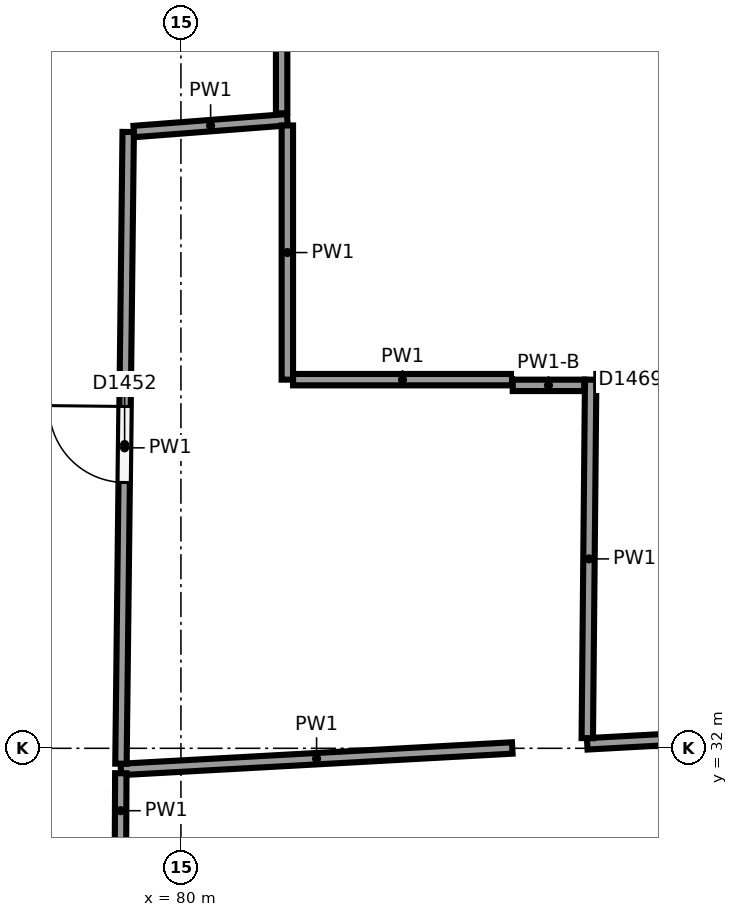
"""IFC4 building model, lengths in metres.
Left out: names, types, materials, properties, quantities, classifications, styles, units other than length and angle.
Written with IfcOpenShell. Run it as: python <this file> out.ifc"""

import sys

from ifc_helpers import new_model, si_unit, direction, frame, frame_2d, origin, origin_2d, place, context, subcontext, project, spatial, rectangle, circle, extrude, element, fill, save


model = new_model("IFC4")
c1 = context("Model", 3, precision=1e-05, world=origin(), true_north=direction((0.0, 1.0)))
c2 = subcontext(c1, "Body", "Model", "MODEL_VIEW")
j1 = project(units=[si_unit("LENGTHUNIT", "METRE"), si_unit("PLANEANGLEUNIT", "RADIAN")], contexts=[c1])
p1 = place(None, origin())
s1 = spatial("IfcSite", under=j1, at=p1, CompositionType="ELEMENT")
p2 = place(p1, origin())
s2 = spatial("IfcBuilding", under=s1, at=p2, CompositionType="ELEMENT")
p3 = place(p2, frame((0.0, 0.0, 18.0)))
s3 = spatial("IfcBuildingStorey", under=s2, at=p3, CompositionType="ELEMENT", Elevation=18.0)
p4 = place(p3, frame((84.925, 30.682, 0.0), z_axis=(0.0, 0.0, 1.0), x_axis=(1.0, 0.0, 0.0)))
e1 = element("IfcColumn", 1, at=p4, inside=s3, PredefinedType="COLUMN", context=c2, shape_type="SweptSolid", body=[
    extrude(circle(Radius=0.5, at=origin_2d()), origin(), (0.0, 0.0, 1.0), 6.0),
])
p5 = place(p3, frame((88.385, 32.225, 0.0), z_axis=(0.0, 0.0, 1.0), x_axis=(-0.99850227238, -0.054710255464, 0.0)))
e2 = element("IfcWall", 2, at=p5, inside=s3, PredefinedType="PARTITIONING", context=c2, shape_type="SweptSolid", body=[
    extrude(rectangle(XDim=3.043, YDim=0.15, at=frame_2d((1.522, 0.0))), origin(), (0.0, 0.0, 1.0), 5.6),
])
p6 = place(p3, frame((85.346, 32.134, 0.0), z_axis=(0.0, 0.0, 1.0), x_axis=(0.009420359449, 0.999955627429, 0.0)))
e3 = element("IfcWall", 3, at=p6, inside=s3, PredefinedType="PARTITIONING", context=c2, shape_type="SweptSolid", body=[
    extrude(rectangle(XDim=4.717, YDim=0.15, at=frame_2d((2.358, 0.0))), origin(), (0.0, 0.0, 1.0), 5.6),
])
p7 = place(p3, frame((85.466, 36.85, 0.0), z_axis=(0.0, 0.0, 1.0), x_axis=(1.0, 0.0, 0.0)))
e4 = element("IfcWall", 4, at=p7, inside=s3, PredefinedType="PARTITIONING", context=c2, shape_type="SweptSolid", body=[
    extrude(rectangle(XDim=2.894, YDim=0.15, at=frame_2d((1.447, 0.0))), origin(), (0.0, 0.0, 1.0), 5.6),
])
p8 = place(p7, frame((0.95, 0.0, 0.0)))
e5 = element("IfcOpeningElement", 5, at=p8, cuts=e4, PredefinedType="OPENING", context=c2, shape_type="SweptSolid", body=[
    extrude(rectangle(XDim=1.0, YDim=2.1, at=frame_2d((0.5, 1.05))), frame((0.0, 0.085, 0.0), z_axis=(0.0, -1.0, 0.0), x_axis=(1.0, 0.0, 0.0)), (0.0, 0.0, 1.0), 0.17),
])
p9 = place(p3, frame((84.36, 32.004, 0.0), z_axis=(0.0, 0.0, 1.0), x_axis=(-0.998501585444, -0.054722791105, 0.0)))
e6 = element("IfcWall", 6, at=p9, inside=s3, PredefinedType="PARTITIONING", context=c2, shape_type="SweptSolid", body=[
    extrude(rectangle(XDim=5.157, YDim=0.15, at=frame_2d((2.579, 0.0))), origin(), (0.0, 0.0, 1.0), 5.6),
])
p10 = place(p3, frame((79.211, 31.797, 0.0), z_axis=(0.0, 0.0, 1.0), x_axis=(0.011484716768, 0.999934048466, 0.0)))
e7 = element("IfcWall", 7, at=p10, inside=s3, PredefinedType="PARTITIONING", context=c2, shape_type="SweptSolid", body=[
    extrude(rectangle(XDim=8.312, YDim=0.15, at=frame_2d((4.156, 0.0))), origin(), (0.0, 0.0, 1.0), 5.6),
])
p11 = place(p10, frame((3.7, 0.0, 0.0)))
e8 = element("IfcOpeningElement", 8, at=p11, cuts=e7, PredefinedType="OPENING", context=c2, shape_type="SweptSolid", body=[
    extrude(rectangle(XDim=1.0, YDim=2.1, at=frame_2d((0.5, 1.05))), frame((0.0, 0.085, 0.0), z_axis=(0.0, -1.0, 0.0), x_axis=(1.0, 0.0, 0.0)), (0.0, 0.0, 1.0), 0.17),
])
p12 = place(p3, frame((79.381, 40.115, 0.0), z_axis=(0.0, 0.0, 1.0), x_axis=(0.997072900492, 0.076456727009, 0.0)))
e9 = element("IfcWall", 9, at=p12, inside=s3, PredefinedType="PARTITIONING", context=c2, shape_type="SweptSolid", body=[
    extrude(rectangle(XDim=2.024, YDim=0.15, at=frame_2d((1.012, 0.0))), origin(), (0.0, 0.0, 1.0), 5.6),
])
p13 = place(p3, frame((81.4, 40.194, 0.0), z_axis=(0.0, 0.0, 1.0), x_axis=(0.0, -1.0, 0.0)))
e10 = element("IfcWall", 10, at=p13, inside=s3, PredefinedType="PARTITIONING", context=c2, shape_type="SweptSolid", body=[
    extrude(rectangle(XDim=3.344, YDim=0.15, at=frame_2d((1.672, 0.0))), origin(), (0.0, 0.0, 1.0), 5.6),
])
p14 = place(p3, frame((81.475, 36.85, 0.0), z_axis=(0.0, 0.0, 1.0), x_axis=(1.0, 0.0, 0.0)))
e11 = element("IfcWall", 11, at=p14, inside=s3, PredefinedType="PARTITIONING", context=c2, shape_type="SweptSolid", body=[
    extrude(rectangle(XDim=2.881, YDim=0.15, at=frame_2d((1.44, 0.0))), origin(), (0.0, 0.0, 1.0), 5.6),
])
p15 = place(p3, frame((79.205, 30.686, 0.0), z_axis=(0.0, 0.0, 1.0), x_axis=(0.004456504396, 0.999990069735, 0.0)))
e12 = element("IfcWall", 12, at=p15, inside=s3, PredefinedType="PARTITIONING", context=c2, shape_type="SweptSolid", body=[
    extrude(rectangle(XDim=0.986, YDim=0.15, at=frame_2d((0.493, 0.0))), origin(), (0.0, 0.0, 1.0), 5.6),
])
p16 = place(p3, frame((81.325, 44.594, 0.0), z_axis=(0.0, 0.0, 1.0), x_axis=(0.0, -1.0, 0.0)))
e13 = element("IfcWall", 13, at=p16, inside=s3, PredefinedType="PARTITIONING", context=c2, shape_type="SweptSolid", body=[
    extrude(rectangle(XDim=4.241, YDim=0.15, at=frame_2d((2.12, 0.0))), origin(), (0.0, 0.0, 1.0), 5.6),
])
p17 = place(p16, frame((1.25, 0.0, 0.0)))
e14 = element("IfcOpeningElement", 14, at=p17, cuts=e13, PredefinedType="OPENING", context=c2, shape_type="SweptSolid", body=[
    extrude(rectangle(XDim=1.8, YDim=2.1, at=frame_2d((0.9, 1.05))), frame((0.0, 0.085, 0.0), z_axis=(0.0, -1.0, 0.0), x_axis=(1.0, 0.0, 0.0)), (0.0, 0.0, 1.0), 0.17),
])
p18 = place(p3, frame((84.366, 36.775, 0.0), z_axis=(0.0, 0.0, 1.0), x_axis=(1.0, 0.0, 0.0)))
e15 = element("IfcWall", 15, at=p18, inside=s3, PredefinedType="PARTITIONING", context=c2, shape_type="SweptSolid", body=[
    extrude(rectangle(XDim=0.94, YDim=0.15, at=frame_2d((0.47, 0.0))), origin(), (0.0, 0.0, 1.0), 4.5),
])
p19 = place(p11, origin())
e16 = element("IfcDoor", 16, at=p19, inside=s3, OperationType="SINGLE_SWING_RIGHT", PredefinedType="DOOR", context=c2, shape_type="SweptSolid", body=[
    extrude(rectangle(XDim=1.0, YDim=2.1, at=frame_2d((0.5, 1.05))), frame((0.0, 0.025, 0.0), z_axis=(0.0, -1.0, 0.0), x_axis=(1.0, 0.0, 0.0)), (0.0, 0.0, 1.0), 0.05),
])
fill(e8, e16)
save(model, sys.argv[1])
